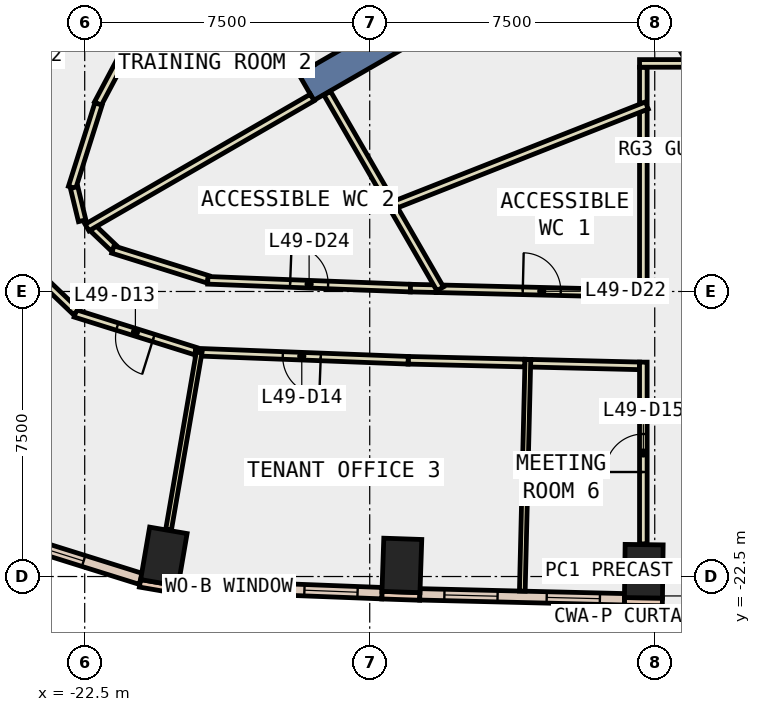
"""IFC4 building model, lengths in metres.
Left out: names, types, materials, properties, quantities, classifications, styles, units other than length and angle.
Written with IfcOpenShell. Run it as: python <this file> out.ifc"""

import sys

from ifc_helpers import new_model, si_unit, direction, frame, frame_2d, origin, origin_2d, place, context, subcontext, project, spatial, polyline, rectangle, outline, extrude, element, fill, save


model = new_model("IFC4")
c1 = context("Model", 3, precision=1e-05, world=origin(), true_north=direction((0.0, 1.0)))
c2 = subcontext(c1, "Body", "Model", "MODEL_VIEW")
j1 = project(units=[si_unit("LENGTHUNIT", "METRE"), si_unit("PLANEANGLEUNIT", "RADIAN")], contexts=[c1])
p1 = place(None, origin())
s1 = spatial("IfcSite", under=j1, at=p1, CompositionType="ELEMENT")
p2 = place(p1, origin())
s2 = spatial("IfcBuilding", under=s1, at=p2, CompositionType="ELEMENT")
p3 = place(p2, frame((0.0, 0.0, 219.2)))
s3 = spatial("IfcBuildingStorey", under=s2, at=p3, CompositionType="ELEMENT", Elevation=219.2)
for number, where, z_axis, x_axis in (
    (1, (-20.417, -21.975, -0.4), (0.0, 0.0, 1.0), (-0.986, 0.169, 0.0)),
    (2, (-14.154, -22.208, -0.4), (0.0, 0.0, 1.0), (-0.999, 0.034, 0.0)),
    (3, (-7.788, -22.361, -0.4), (0.0, 0.0, 1.0), (-1.0, 0.013, 0.0)),
):
    element("IfcColumn", number, at=place(p3, frame(where, z_axis=z_axis, x_axis=x_axis)), inside=s3, PredefinedType="COLUMN", context=c2, shape_type="SweptSolid", body=[
        extrude(rectangle(XDim=1.0, YDim=1.4, at=origin_2d()), origin(), (0.0, 0.0, 1.0), 4.2),
    ])
p4 = place(p3, frame((0.0, 0.0, -0.4)))
e4 = element("IfcWall", 4, at=p4, inside=s3, PredefinedType="SHEAR", context=c2, shape_type="SweptSolid", body=[
    extrude(outline(polyline([(-13.279, 2.5), (-6.64, -9.0), (-6.235, -8.3), (-12.471, 2.5), (-13.279, 2.5)])), origin(), (0.0, 0.0, 1.0), 4.2),
])
p5 = place(p3, frame((-8.877, -5.125, -0.4), z_axis=(0.0, 0.0, 1.0), x_axis=(-0.866017533419, -0.500013631625, 0.0)))
e5 = element("IfcWall", 5, at=p5, inside=s3, PredefinedType="SHEAR", context=c2, shape_type="SweptSolid", body=[
    extrude(rectangle(XDim=9.0, YDim=0.8, at=frame_2d((4.5, 0.0))), origin(), (0.0, 0.0, 1.0), 4.2),
])
p6 = place(p3, frame((-21.045, -22.679, 0.0), z_axis=(0.0, 0.0, 1.0), x_axis=(0.985631544579, -0.168909615862, 0.0)))
e6 = element("IfcWall", 6, at=p6, inside=s3, PredefinedType="STANDARD", context=c2, shape_type="SweptSolid", body=[
    extrude(rectangle(XDim=1.0, YDim=0.2, at=frame_2d((0.5, 0.0))), origin(), (0.0, 0.0, 1.0), 3.8),
])
p7 = place(p3, frame((-14.681, -22.99, 0.0), z_axis=(0.0, 0.0, 1.0), x_axis=(0.999423561854, -0.033949138587, 0.0)))
e7 = element("IfcWall", 7, at=p7, inside=s3, PredefinedType="STANDARD", context=c2, shape_type="SweptSolid", body=[
    extrude(rectangle(XDim=1.0, YDim=0.2, at=frame_2d((0.5, 0.0))), origin(), (0.0, 0.0, 1.0), 3.8),
])
p8 = place(p3, frame((-8.299, -23.154, 0.0), z_axis=(0.0, 0.0, 1.0), x_axis=(0.999903186316, -0.013914668364, 0.0)))
e8 = element("IfcWall", 8, at=p8, inside=s3, PredefinedType="STANDARD", context=c2, shape_type="SweptSolid", body=[
    extrude(rectangle(XDim=1.0, YDim=0.2, at=frame_2d((0.5, 0.0))), origin(), (0.0, 0.0, 1.0), 3.8),
])
p9 = place(p3, frame((-20.04, -22.732, 0.0), z_axis=(0.0, 0.0, 1.0), x_axis=(0.99926218254, -0.038406907512, 0.0)))
e9 = element("IfcWall", 9, at=p9, inside=s3, PredefinedType="STANDARD", context=c2, shape_type="SweptSolid", body=[
    extrude(rectangle(XDim=5.365, YDim=0.3, at=frame_2d((2.683, 0.0))), origin(), (0.0, 0.0, 1.0), 3.8),
])
p10 = place(p9, frame((0.641, 0.0, 0.9)))
e10 = element("IfcOpeningElement", 10, at=p10, cuts=e9, PredefinedType="OPENING", context=c2, shape_type="SweptSolid", body=[
    extrude(rectangle(XDim=1.4, YDim=2.6, at=frame_2d((0.7, 1.3))), frame((0.0, 0.16, 0.0), z_axis=(0.0, -1.0, 0.0), x_axis=(1.0, 0.0, 0.0)), (0.0, 0.0, 1.0), 0.32),
])
p11 = place(p9, frame((3.324, 0.0, 0.9)))
e11 = element("IfcOpeningElement", 11, at=p11, cuts=e9, PredefinedType="OPENING", context=c2, shape_type="SweptSolid", body=[
    extrude(rectangle(XDim=1.4, YDim=2.6, at=frame_2d((0.7, 1.3))), frame((0.0, 0.16, 0.0), z_axis=(0.0, -1.0, 0.0), x_axis=(1.0, 0.0, 0.0)), (0.0, 0.0, 1.0), 0.32),
])
p12 = place(p3, frame((-13.681, -22.969, 0.0), z_axis=(0.0, 0.0, 1.0), x_axis=(0.999708030006, -0.024163086341, 0.0)))
e12 = element("IfcWall", 12, at=p12, inside=s3, PredefinedType="STANDARD", context=c2, shape_type="SweptSolid", body=[
    extrude(rectangle(XDim=5.385, YDim=0.3, at=frame_2d((2.693, 0.0))), origin(), (0.0, 0.0, 1.0), 3.8),
])
p13 = place(p12, frame((0.646, 0.0, 0.9)))
e13 = element("IfcOpeningElement", 13, at=p13, cuts=e12, PredefinedType="OPENING", context=c2, shape_type="SweptSolid", body=[
    extrude(rectangle(XDim=1.4, YDim=2.6, at=frame_2d((0.7, 1.3))), frame((0.0, 0.16, 0.0), z_axis=(0.0, -1.0, 0.0), x_axis=(1.0, 0.0, 0.0)), (0.0, 0.0, 1.0), 0.32),
])
p14 = place(p12, frame((3.339, 0.0, 0.9)))
e14 = element("IfcOpeningElement", 14, at=p14, cuts=e12, PredefinedType="OPENING", context=c2, shape_type="SweptSolid", body=[
    extrude(rectangle(XDim=1.4, YDim=2.6, at=frame_2d((0.7, 1.3))), frame((0.0, 0.16, 0.0), z_axis=(0.0, -1.0, 0.0), x_axis=(1.0, 0.0, 0.0)), (0.0, 0.0, 1.0), 0.32),
])
p15 = place(p3, frame((-25.367, -21.202, 0.0), z_axis=(0.0, 0.0, 1.0), x_axis=(0.954297481837, -0.298858354675, 0.0)))
e15 = element("IfcWall", 15, at=p15, inside=s3, PredefinedType="STANDARD", context=c2, shape_type="SweptSolid", body=[
    extrude(rectangle(XDim=4.551, YDim=0.3, at=frame_2d((2.275, 0.0))), origin(), (0.0, 0.0, 1.0), 3.8),
])
p16 = place(p15, frame((1.575, 0.0, 0.9)))
e16 = element("IfcOpeningElement", 16, at=p16, cuts=e15, PredefinedType="OPENING", context=c2, shape_type="SweptSolid", body=[
    extrude(rectangle(XDim=1.4, YDim=2.6, at=frame_2d((0.7, 1.3))), frame((0.0, 0.16, 0.0), z_axis=(0.0, -1.0, 0.0), x_axis=(1.0, 0.0, 0.0)), (0.0, 0.0, 1.0), 0.32),
])
p17 = place(p3, frame((-13.246, -14.927, 0.0), z_axis=(0.0, 0.0, 1.0), x_axis=(0.999708107757, -0.024159869312, 0.0)))
e17 = element("IfcWall", 17, at=p17, inside=s3, PredefinedType="PARTITIONING", context=c2, shape_type="SweptSolid", body=[
    extrude(rectangle(XDim=5.548, YDim=0.2, at=frame_2d((2.774, 0.0))), origin(), (0.0, 0.0, 1.0), 3.8),
])
p18 = place(p17, frame((2.274, 0.0, 0.0)))
e18 = element("IfcOpeningElement", 18, at=p18, cuts=e17, PredefinedType="OPENING", context=c2, shape_type="SweptSolid", body=[
    extrude(rectangle(XDim=1.0, YDim=2.1, at=frame_2d((0.5, 1.05))), frame((0.0, 0.11, 0.0), z_axis=(0.0, -1.0, 0.0), x_axis=(1.0, 0.0, 0.0)), (0.0, 0.0, 1.0), 0.22),
])
p19 = place(p3, frame((-19.154, -4.397, 0.0), z_axis=(0.0, 0.0, 1.0), x_axis=(-0.468118749105, -0.883665568378, 0.0)))
e19 = element("IfcWall", 19, at=p19, inside=s3, PredefinedType="PARTITIONING", context=c2, shape_type="SweptSolid", body=[
    extrude(rectangle(XDim=6.409, YDim=0.2, at=frame_2d((3.204, 0.0))), origin(), (0.0, 0.0, 1.0), 3.8),
])
p20 = place(p19, frame((2.704, 0.0, 0.0)))
e20 = element("IfcOpeningElement", 20, at=p20, cuts=e19, PredefinedType="OPENING", context=c2, shape_type="SweptSolid", body=[
    extrude(rectangle(XDim=1.0, YDim=2.1, at=frame_2d((0.5, 1.05))), frame((0.0, 0.11, 0.0), z_axis=(0.0, -1.0, 0.0), x_axis=(1.0, 0.0, 0.0)), (0.0, 0.0, 1.0), 0.22),
])
p21 = place(p3, frame((-22.137, -10.067, 0.0), z_axis=(0.0, 0.0, 1.0), x_axis=(-0.302262657712, -0.953224677478, 0.0)))
e21 = element("IfcWall", 21, at=p21, inside=s3, PredefinedType="PARTITIONING", context=c2, shape_type="SweptSolid", body=[
    extrude(rectangle(XDim=2.303, YDim=0.2, at=frame_2d((1.151, 0.0))), origin(), (0.0, 0.0, 1.0), 3.8),
])
p22 = place(p3, frame((-22.779, -12.264, 0.0), z_axis=(0.0, 0.0, 1.0), x_axis=(0.2356388299, -0.971840697771, 0.0)))
e22 = element("IfcWall", 22, at=p22, inside=s3, PredefinedType="PARTITIONING", context=c2, shape_type="SweptSolid", body=[
    extrude(rectangle(XDim=0.9, YDim=0.2, at=frame_2d((0.45, 0.0))), origin(), (0.0, 0.0, 1.0), 3.8),
])
p23 = place(p3, frame((-22.281, -13.337, 0.0), z_axis=(0.0, 0.0, 1.0), x_axis=(0.723443840005, -0.690383234413, 0.0)))
e23 = element("IfcWall", 23, at=p23, inside=s3, PredefinedType="PARTITIONING", context=c2, shape_type="SweptSolid", body=[
    extrude(rectangle(XDim=0.753, YDim=0.2, at=frame_2d((0.376, 0.0))), origin(), (0.0, 0.0, 1.0), 3.8),
])
p24 = place(p3, frame((-21.759, -13.896, 0.0), z_axis=(0.0, 0.0, 1.0), x_axis=(0.954254371194, -0.298995978328, 0.0)))
e24 = element("IfcWall", 24, at=p24, inside=s3, PredefinedType="PARTITIONING", context=c2, shape_type="SweptSolid", body=[
    extrude(rectangle(XDim=2.622, YDim=0.2, at=frame_2d((1.311, 0.0))), origin(), (0.0, 0.0, 1.0), 3.8),
])
p25 = place(p3, frame((-19.261, -14.706, 0.0), z_axis=(0.0, 0.0, 1.0), x_axis=(0.999262930749, -0.038387435847, 0.0)))
e25 = element("IfcWall", 25, at=p25, inside=s3, PredefinedType="PARTITIONING", context=c2, shape_type="SweptSolid", body=[
    extrude(rectangle(XDim=5.336, YDim=0.2, at=frame_2d((2.668, 0.0))), origin(), (0.0, 0.0, 1.0), 3.8),
])
p26 = place(p25, frame((2.168, 0.0, 0.0)))
e26 = element("IfcOpeningElement", 26, at=p26, cuts=e25, PredefinedType="OPENING", context=c2, shape_type="SweptSolid", body=[
    extrude(rectangle(XDim=1.0, YDim=2.1, at=frame_2d((0.5, 1.05))), frame((0.0, 0.11, 0.0), z_axis=(0.0, -1.0, 0.0), x_axis=(1.0, 0.0, 0.0)), (0.0, 0.0, 1.0), 0.22),
])
p27 = place(p3, frame((-13.929, -14.911, 0.0), z_axis=(0.0, 0.0, 1.0), x_axis=(0.999721713829, -0.023590144123, 0.0)))
e27 = element("IfcWall", 27, at=p27, inside=s3, PredefinedType="PARTITIONING", context=c2, shape_type="SweptSolid", body=[
    extrude(rectangle(XDim=0.683, YDim=0.2, at=frame_2d((0.342, 0.0))), origin(), (0.0, 0.0, 1.0), 3.8),
])
p28 = place(p3, frame((-23.878, -9.256, 0.0), z_axis=(0.0, 0.0, 1.0), x_axis=(0.46795384568, 0.883752905689, 0.0)))
e28 = element("IfcWall", 28, at=p28, inside=s3, PredefinedType="PARTITIONING", context=c2, shape_type="SweptSolid", body=[
    extrude(rectangle(XDim=3.562, YDim=0.2, at=frame_2d((1.781, 0.0))), origin(), (0.0, 0.0, 1.0), 3.8),
])
p29 = place(p28, frame((1.281, 0.0, 0.0)))
e29 = element("IfcOpeningElement", 29, at=p29, cuts=e28, PredefinedType="OPENING", context=c2, shape_type="SweptSolid", body=[
    extrude(rectangle(XDim=1.0, YDim=2.1, at=frame_2d((0.5, 1.05))), frame((0.0, 0.11, 0.0), z_axis=(0.0, -1.0, 0.0), x_axis=(1.0, 0.0, 0.0)), (0.0, 0.0, 1.0), 0.22),
])
p30 = place(p3, frame((-19.583, -16.569, 0.0), z_axis=(0.0, 0.0, 1.0), x_axis=(-0.954238750745, 0.299045826884, 0.0)))
e30 = element("IfcWall", 30, at=p30, inside=s3, PredefinedType="PARTITIONING", context=c2, shape_type="SweptSolid", body=[
    extrude(rectangle(XDim=3.318, YDim=0.2, at=frame_2d((1.659, 0.0))), origin(), (0.0, 0.0, 1.0), 3.8),
])
p31 = place(p30, frame((1.159, 0.0, 0.0)))
e31 = element("IfcOpeningElement", 31, at=p31, cuts=e30, PredefinedType="OPENING", context=c2, shape_type="SweptSolid", body=[
    extrude(rectangle(XDim=1.0, YDim=2.1, at=frame_2d((0.5, 1.05))), frame((0.0, 0.11, 0.0), z_axis=(0.0, -1.0, 0.0), x_axis=(1.0, 0.0, 0.0)), (0.0, 0.0, 1.0), 0.22),
])
p32 = place(p3, frame((-22.726, -15.538, 0.0), z_axis=(0.0, 0.0, 1.0), x_axis=(-0.723967420116, 0.689834164571, 0.0)))
e32 = element("IfcWall", 32, at=p32, inside=s3, PredefinedType="PARTITIONING", context=c2, shape_type="SweptSolid", body=[
    extrude(rectangle(XDim=2.282, YDim=0.2, at=frame_2d((1.141, 0.0))), origin(), (0.0, 0.0, 1.0), 3.8),
])
p33 = place(p3, frame((-10.915, -16.884, 0.0), z_axis=(0.0, 0.0, 1.0), x_axis=(-0.999710384303, 0.024065483947, 0.0)))
e33 = element("IfcWall", 33, at=p33, inside=s3, PredefinedType="PARTITIONING", context=c2, shape_type="SweptSolid", body=[
    extrude(rectangle(XDim=3.074, YDim=0.2, at=frame_2d((1.537, 0.0))), origin(), (0.0, 0.0, 1.0), 3.8),
])
p34 = place(p3, frame((-13.988, -16.81, 0.0), z_axis=(0.0, 0.0, 1.0), x_axis=(-0.999263168163, 0.038381255227, 0.0)))
e34 = element("IfcWall", 34, at=p34, inside=s3, PredefinedType="PARTITIONING", context=c2, shape_type="SweptSolid", body=[
    extrude(rectangle(XDim=5.604, YDim=0.2, at=frame_2d((2.802, 0.0))), origin(), (0.0, 0.0, 1.0), 3.8),
])
p35 = place(p34, frame((2.302, 0.0, 0.0)))
e35 = element("IfcOpeningElement", 35, at=p35, cuts=e34, PredefinedType="OPENING", context=c2, shape_type="SweptSolid", body=[
    extrude(rectangle(XDim=1.0, YDim=2.1, at=frame_2d((0.5, 1.05))), frame((0.0, 0.11, 0.0), z_axis=(0.0, -1.0, 0.0), x_axis=(1.0, 0.0, 0.0)), (0.0, 0.0, 1.0), 0.22),
])
p36 = place(p3, frame((-7.9, -16.957, 0.0), z_axis=(0.0, 0.0, 1.0), x_axis=(-0.999709338637, 0.024108883071, 0.0)))
e36 = element("IfcWall", 36, at=p36, inside=s3, PredefinedType="PARTITIONING", context=c2, shape_type="SweptSolid", body=[
    extrude(rectangle(XDim=2.866, YDim=0.2, at=frame_2d((1.433, 0.0))), origin(), (0.0, 0.0, 1.0), 3.8),
])
p37 = place(p3, frame((-7.8, -10.041, 0.0), z_axis=(0.0, 0.0, 1.0), x_axis=(0.0, 1.0, 0.0)))
e37 = element("IfcWall", 37, at=p37, inside=s3, PredefinedType="PARTITIONING", context=c2, shape_type="SweptSolid", body=[
    extrude(rectangle(XDim=0.942, YDim=0.2, at=frame_2d((0.471, 0.0))), origin(), (0.0, 0.0, 1.0), 3.8),
])
p38 = place(p3, frame((-7.9, -8.999, 0.0), z_axis=(0.0, 0.0, 1.0), x_axis=(1.0, 0.0, 0.0)))
e38 = element("IfcWall", 38, at=p38, inside=s3, PredefinedType="PARTITIONING", context=c2, shape_type="SweptSolid", body=[
    extrude(rectangle(XDim=1.259, YDim=0.2, at=frame_2d((0.629, 0.0))), origin(), (0.0, 0.0, 1.0), 3.8),
])
p39 = place(p3, frame((-7.8, -14.959, 0.0), z_axis=(0.0, 0.0, 1.0), x_axis=(0.0, 1.0, 0.0)))
e39 = element("IfcWall", 39, at=p39, inside=s3, PredefinedType="PARTITIONING", context=c2, shape_type="SweptSolid", body=[
    extrude(rectangle(XDim=4.718, YDim=0.2, at=frame_2d((2.359, 0.0))), origin(), (0.0, 0.0, 1.0), 3.8),
])
p40 = place(p3, frame((-7.8, -21.641, 0.0), z_axis=(0.0, 0.0, 1.0), x_axis=(0.0, 1.0, 0.0)))
e40 = element("IfcWall", 40, at=p40, inside=s3, PredefinedType="PARTITIONING", context=c2, shape_type="SweptSolid", body=[
    extrude(rectangle(XDim=4.782, YDim=0.2, at=frame_2d((2.391, 0.0))), origin(), (0.0, 0.0, 1.0), 3.8),
])
p41 = place(p40, frame((1.891, 0.0, 0.0)))
e41 = element("IfcOpeningElement", 41, at=p41, cuts=e40, PredefinedType="OPENING", context=c2, shape_type="SweptSolid", body=[
    extrude(rectangle(XDim=1.0, YDim=2.1, at=frame_2d((0.5, 1.05))), frame((0.0, 0.11, 0.0), z_axis=(0.0, -1.0, 0.0), x_axis=(1.0, 0.0, 0.0)), (0.0, 0.0, 1.0), 0.22),
])
p42 = place(p3, frame((-7.707, -10.105, 0.0), z_axis=(0.0, 0.0, 1.0), x_axis=(-0.930316800812, -0.36675693603, 0.0)))
e42 = element("IfcWall", 42, at=p42, inside=s3, PredefinedType="PARTITIONING", context=c2, shape_type="SweptSolid", body=[
    extrude(rectangle(XDim=7.302, YDim=0.2, at=frame_2d((3.651, 0.0))), origin(), (0.0, 0.0, 1.0), 3.8),
])
p43 = place(p3, frame((-16.525, -9.079, 0.0), z_axis=(0.0, 0.0, 1.0), x_axis=(-0.499943228252, 0.866058178487, 0.0)))
e43 = element("IfcWall", 43, at=p43, inside=s3, PredefinedType="PARTITIONING", context=c2, shape_type="SweptSolid", body=[
    extrude(rectangle(XDim=5.329, YDim=0.15, at=frame_2d((2.664, 0.0))), origin(), (0.0, 0.0, 1.0), 3.8),
])
p44 = place(p3, frame((-14.457, -12.66, 0.0), z_axis=(0.0, 0.0, 1.0), x_axis=(-0.49997268395, 0.866041174139, 0.0)))
e44 = element("IfcWall", 44, at=p44, inside=s3, PredefinedType="PARTITIONING", context=c2, shape_type="SweptSolid", body=[
    extrude(rectangle(XDim=3.322, YDim=0.2, at=frame_2d((1.661, 0.0))), origin(), (0.0, 0.0, 1.0), 3.8),
])
p45 = place(p3, frame((-13.146, -14.93, 0.0), z_axis=(0.0, 0.0, 1.0), x_axis=(-0.500086091327, 0.865975693228, 0.0)))
e45 = element("IfcWall", 45, at=p45, inside=s3, PredefinedType="PARTITIONING", context=c2, shape_type="SweptSolid", body=[
    extrude(rectangle(XDim=2.421, YDim=0.2, at=frame_2d((1.211, 0.0))), origin(), (0.0, 0.0, 1.0), 3.8),
])
p46 = place(p3, frame((-16.514, -9.897, 0.0), z_axis=(0.0, 0.0, 1.0), x_axis=(-0.866041209536, -0.499972622635, 0.0)))
e46 = element("IfcWall", 46, at=p46, inside=s3, PredefinedType="PARTITIONING", context=c2, shape_type="SweptSolid", body=[
    extrude(rectangle(XDim=6.843, YDim=0.2, at=frame_2d((3.421, 0.0))), origin(), (0.0, 0.0, 1.0), 3.8),
])
p47 = place(p3, frame((-19.488, -16.599, 0.0), z_axis=(0.0, 0.0, 1.0), x_axis=(-0.169963884325, -0.985450292011, 0.0)))
e47 = element("IfcWall", 47, at=p47, inside=s3, PredefinedType="PARTITIONING", context=c2, shape_type="SweptSolid", body=[
    extrude(rectangle(XDim=4.736, YDim=0.15, at=frame_2d((2.368, 0.0))), origin(), (0.0, 0.0, 1.0), 3.8),
])
p48 = place(p3, frame((-10.838, -16.786, 0.0), z_axis=(0.0, 0.0, 1.0), x_axis=(-0.024134212614, -0.999708727471, 0.0)))
e48 = element("IfcWall", 48, at=p48, inside=s3, PredefinedType="PARTITIONING", context=c2, shape_type="SweptSolid", body=[
    extrude(rectangle(XDim=6.1, YDim=0.15, at=frame_2d((3.05, 0.0))), origin(), (0.0, 0.0, 1.0), 3.8),
])
p49 = place(p10, origin())
e49 = element("IfcWindow", 49, at=p49, inside=s3, PartitioningType="SINGLE_PANEL", PredefinedType="WINDOW", context=c2, shape_type="SweptSolid", body=[
    extrude(rectangle(XDim=1.4, YDim=2.6, at=frame_2d((0.7, 1.3))), frame((0.0, 0.03, 0.0), z_axis=(0.0, -1.0, 0.0), x_axis=(1.0, 0.0, 0.0)), (0.0, 0.0, 1.0), 0.06),
])
fill(e10, e49)
p50 = place(p11, origin())
e50 = element("IfcWindow", 50, at=p50, inside=s3, PartitioningType="SINGLE_PANEL", PredefinedType="WINDOW", context=c2, shape_type="SweptSolid", body=[
    extrude(rectangle(XDim=1.4, YDim=2.6, at=frame_2d((0.7, 1.3))), frame((0.0, 0.03, 0.0), z_axis=(0.0, -1.0, 0.0), x_axis=(1.0, 0.0, 0.0)), (0.0, 0.0, 1.0), 0.06),
])
fill(e11, e50)
p51 = place(p13, origin())
e51 = element("IfcWindow", 51, at=p51, inside=s3, PartitioningType="SINGLE_PANEL", PredefinedType="WINDOW", context=c2, shape_type="SweptSolid", body=[
    extrude(rectangle(XDim=1.4, YDim=2.6, at=frame_2d((0.7, 1.3))), frame((0.0, 0.03, 0.0), z_axis=(0.0, -1.0, 0.0), x_axis=(1.0, 0.0, 0.0)), (0.0, 0.0, 1.0), 0.06),
])
fill(e13, e51)
p52 = place(p14, origin())
e52 = element("IfcWindow", 52, at=p52, inside=s3, PartitioningType="SINGLE_PANEL", PredefinedType="WINDOW", context=c2, shape_type="SweptSolid", body=[
    extrude(rectangle(XDim=1.4, YDim=2.6, at=frame_2d((0.7, 1.3))), frame((0.0, 0.03, 0.0), z_axis=(0.0, -1.0, 0.0), x_axis=(1.0, 0.0, 0.0)), (0.0, 0.0, 1.0), 0.06),
])
fill(e14, e52)
p53 = place(p16, origin())
e53 = element("IfcWindow", 53, at=p53, inside=s3, PartitioningType="SINGLE_PANEL", PredefinedType="WINDOW", context=c2, shape_type="SweptSolid", body=[
    extrude(rectangle(XDim=1.4, YDim=2.6, at=frame_2d((0.7, 1.3))), frame((0.0, 0.03, 0.0), z_axis=(0.0, -1.0, 0.0), x_axis=(1.0, 0.0, 0.0)), (0.0, 0.0, 1.0), 0.06),
])
fill(e16, e53)
p54 = place(p31, origin())
e54 = element("IfcDoor", 54, at=p54, inside=s3, OperationType="SINGLE_SWING_RIGHT", PredefinedType="DOOR", context=c2, shape_type="SweptSolid", body=[
    extrude(rectangle(XDim=1.0, YDim=2.1, at=frame_2d((0.5, 1.05))), frame((0.0, 0.025, 0.0), z_axis=(0.0, -1.0, 0.0), x_axis=(1.0, 0.0, 0.0)), (0.0, 0.0, 1.0), 0.05),
])
fill(e31, e54)
p55 = place(p35, origin())
e55 = element("IfcDoor", 55, at=p55, inside=s3, OperationType="SINGLE_SWING_LEFT", PredefinedType="DOOR", context=c2, shape_type="SweptSolid", body=[
    extrude(rectangle(XDim=1.0, YDim=2.1, at=frame_2d((0.5, 1.05))), frame((0.0, 0.025, 0.0), z_axis=(0.0, -1.0, 0.0), x_axis=(1.0, 0.0, 0.0)), (0.0, 0.0, 1.0), 0.05),
])
fill(e35, e55)
p56 = place(p41, origin())
e56 = element("IfcDoor", 56, at=p56, inside=s3, OperationType="SINGLE_SWING_LEFT", PredefinedType="DOOR", context=c2, shape_type="SweptSolid", body=[
    extrude(rectangle(XDim=1.0, YDim=2.1, at=frame_2d((0.5, 1.05))), frame((0.0, 0.025, 0.0), z_axis=(0.0, -1.0, 0.0), x_axis=(1.0, 0.0, 0.0)), (0.0, 0.0, 1.0), 0.05),
])
fill(e41, e56)
p57 = place(p18, origin())
e57 = element("IfcDoor", 57, at=p57, inside=s3, OperationType="SINGLE_SWING_LEFT", PredefinedType="DOOR", context=c2, shape_type="SweptSolid", body=[
    extrude(rectangle(XDim=1.0, YDim=2.1, at=frame_2d((0.5, 1.05))), frame((0.0, 0.025, 0.0), z_axis=(0.0, -1.0, 0.0), x_axis=(1.0, 0.0, 0.0)), (0.0, 0.0, 1.0), 0.05),
])
fill(e18, e57)
p58 = place(p26, origin())
e58 = element("IfcDoor", 58, at=p58, inside=s3, OperationType="SINGLE_SWING_LEFT", PredefinedType="DOOR", context=c2, shape_type="SweptSolid", body=[
    extrude(rectangle(XDim=1.0, YDim=2.1, at=frame_2d((0.5, 1.05))), frame((0.0, 0.025, 0.0), z_axis=(0.0, -1.0, 0.0), x_axis=(1.0, 0.0, 0.0)), (0.0, 0.0, 1.0), 0.05),
])
fill(e26, e58)
save(model, sys.argv[1])
